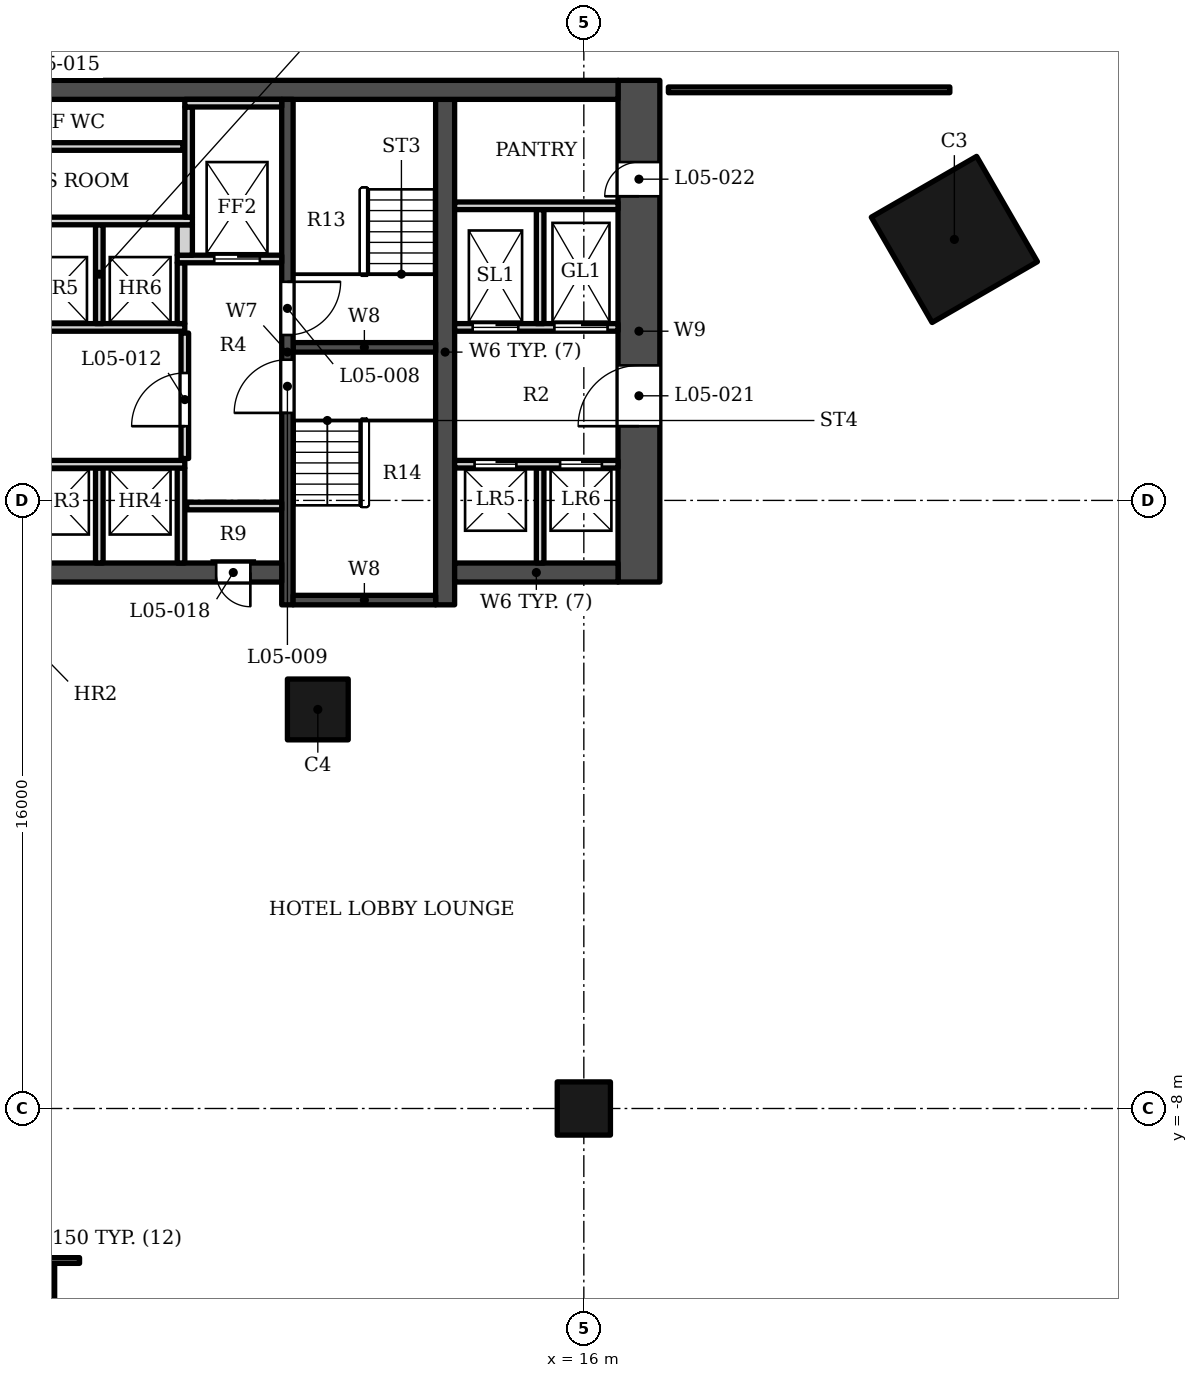
"""IFC4 building model, lengths in metres.
Left out: names, types, materials, properties, quantities, classifications, styles, units other than length and angle.
Written with IfcOpenShell. Run it as: python <this file> out.ifc"""

import sys

from ifc_helpers import new_model, si_unit, direction, frame, frame_2d, origin, origin_2d, place, context, subcontext, project, spatial, rectangle, extrude, element, fill, save


model = new_model("IFC4")
c1 = context("Model", 3, precision=1e-05, world=origin(), true_north=direction((0.0, 1.0)))
c2 = subcontext(c1, "Body", "Model", "MODEL_VIEW")
j1 = project(units=[si_unit("LENGTHUNIT", "METRE"), si_unit("PLANEANGLEUNIT", "RADIAN")], contexts=[c1])
p1 = place(None, origin())
s1 = spatial("IfcSite", under=j1, at=p1, CompositionType="ELEMENT")
p2 = place(p1, origin())
s2 = spatial("IfcBuilding", under=s1, at=p2, CompositionType="ELEMENT")
p3 = place(p2, frame((0.0, 0.0, 40.0)))
s3 = spatial("IfcBuildingStorey", under=s2, at=p3, CompositionType="ELEMENT", Elevation=40.0)
p4 = place(p3, frame((16.0, -8.0, 0.0), z_axis=(0.0, 0.0, 1.0), x_axis=(1.0, 0.0, 0.0)))
e1 = element("IfcColumn", 1, at=p4, inside=s3, PredefinedType="COLUMN", context=c2, shape_type="SweptSolid", body=[
    extrude(rectangle(XDim=1.4, YDim=1.4, at=origin_2d()), origin(), (0.0, 0.0, 1.0), 6.0),
])
p5 = place(p3, frame((25.75, 14.867, 0.0), z_axis=(0.0, 0.0, 1.0), x_axis=(-0.866025386331, -0.50000003023, 0.0)))
e2 = element("IfcColumn", 2, at=p5, inside=s3, PredefinedType="COLUMN", context=c2, shape_type="SweptSolid", body=[
    extrude(rectangle(XDim=3.2, YDim=3.2, at=origin_2d()), origin(), (0.0, 0.0, 1.0), 6.0),
])
p6 = place(p3, frame((9.0, 2.5, 0.0), z_axis=(0.0, 0.0, 1.0), x_axis=(1.0, 0.0, 0.0)))
e3 = element("IfcColumn", 3, at=p6, inside=s3, PredefinedType="COLUMN", context=c2, shape_type="SweptSolid", body=[
    extrude(rectangle(XDim=1.6, YDim=1.6, at=origin_2d()), origin(), (0.0, 0.0, 1.0), 6.0),
])
p7 = place(p3, frame((-16.9, 18.802, 0.0), z_axis=(0.0, 0.0, 1.0), x_axis=(1.0, 0.0, 0.0)))
e4 = element("IfcWall", 4, at=p7, inside=s3, PredefinedType="SHEAR", context=c2, shape_type="SweptSolid", body=[
    extrude(rectangle(XDim=33.8, YDim=0.5, at=frame_2d((16.9, 0.0))), origin(), (0.0, 0.0, 1.0), 6.0),
])
p8 = place(p3, frame((12.35, 5.253, 0.0), z_axis=(0.0, 0.0, 1.0), x_axis=(0.0, 1.0, 0.0)))
e5 = element("IfcWall", 5, at=p8, inside=s3, PredefinedType="SHEAR", context=c2, shape_type="SweptSolid", body=[
    extrude(rectangle(XDim=13.3, YDim=0.5, at=frame_2d((6.65, 0.0))), origin(), (0.0, 0.0, 1.0), 6.0),
])
p9 = place(p3, frame((8.2, 5.253, 0.0), z_axis=(0.0, 0.0, 1.0), x_axis=(0.0, 1.0, 0.0)))
e6 = element("IfcWall", 6, at=p9, inside=s3, PredefinedType="SHEAR", context=c2, shape_type="SweptSolid", body=[
    extrude(rectangle(XDim=13.3, YDim=0.3, at=frame_2d((6.65, 0.0))), origin(), (0.0, 0.0, 1.0), 6.0),
])
p10 = place(p9, frame((7.1, 0.0, 0.0)))
e7 = element("IfcOpeningElement", 7, at=p10, cuts=e6, PredefinedType="OPENING", context=c2, shape_type="SweptSolid", body=[
    extrude(rectangle(XDim=1.4, YDim=2.1, at=frame_2d((0.7, 1.05))), frame((0.0, 0.16, 0.0), z_axis=(0.0, -1.0, 0.0), x_axis=(1.0, 0.0, 0.0)), (0.0, 0.0, 1.0), 0.32),
])
p11 = place(p9, frame((5.05, 0.0, 0.0)))
e8 = element("IfcOpeningElement", 8, at=p11, cuts=e6, PredefinedType="OPENING", context=c2, shape_type="SweptSolid", body=[
    extrude(rectangle(XDim=1.4, YDim=2.1, at=frame_2d((0.7, 1.05))), frame((0.0, 0.16, 0.0), z_axis=(0.0, -1.0, 0.0), x_axis=(1.0, 0.0, 0.0)), (0.0, 0.0, 1.0), 0.32),
])
for number, where, z_axis, x_axis in (
    (9, (8.35, 12.028, 0.0), (0.0, 0.0, 1.0), (1.0, 0.0, 0.0)),
    (10, (8.35, 5.378, 0.0), (0.0, 0.0, 1.0), (1.0, 0.0, 0.0)),
):
    element("IfcWall", number, at=place(p3, frame(where, z_axis=z_axis, x_axis=x_axis)), inside=s3, PredefinedType="SHEAR", context=c2, shape_type="SweptSolid", body=[
        extrude(rectangle(XDim=3.75, YDim=0.25, at=frame_2d((1.875, 0.0))), origin(), (0.0, 0.0, 1.0), 6.0),
    ])
p12 = place(p3, frame((1.0, 6.103, 0.0), z_axis=(0.0, 0.0, 1.0), x_axis=(1.0, 0.0, 0.0)))
e11 = element("IfcWall", 11, at=p12, inside=s3, PredefinedType="SHEAR", context=c2, shape_type="SweptSolid", body=[
    extrude(rectangle(XDim=7.05, YDim=0.5, at=frame_2d((3.525, 0.0))), origin(), (0.0, 0.0, 1.0), 6.0),
])
p13 = place(p12, frame((5.325, 0.0, 0.0)))
e12 = element("IfcOpeningElement", 12, at=p13, cuts=e11, PredefinedType="OPENING", context=c2, shape_type="SweptSolid", body=[
    extrude(rectangle(XDim=0.9, YDim=2.1, at=frame_2d((0.45, 1.05))), frame((0.0, 0.26, 0.0), z_axis=(0.0, -1.0, 0.0), x_axis=(1.0, 0.0, 0.0)), (0.0, 0.0, 1.0), 0.52),
])
p14 = place(p3, frame((12.6, 6.103, 0.0), z_axis=(0.0, 0.0, 1.0), x_axis=(1.0, 0.0, 0.0)))
e13 = element("IfcWall", 13, at=p14, inside=s3, PredefinedType="SHEAR", context=c2, shape_type="SweptSolid", body=[
    extrude(rectangle(XDim=4.3, YDim=0.5, at=frame_2d((2.15, 0.0))), origin(), (0.0, 0.0, 1.0), 6.0),
])
p15 = place(p3, frame((17.45, 5.853, 0.0), z_axis=(0.0, 0.0, 1.0), x_axis=(0.0, 1.0, 0.0)))
e14 = element("IfcWall", 14, at=p15, inside=s3, PredefinedType="SHEAR", context=c2, shape_type="SweptSolid", body=[
    extrude(rectangle(XDim=13.2, YDim=1.1, at=frame_2d((6.6, 0.0))), origin(), (0.0, 0.0, 1.0), 6.0),
])
p16 = place(p15, frame((4.1, 0.0, 0.0)))
e15 = element("IfcOpeningElement", 15, at=p16, cuts=e14, PredefinedType="OPENING", context=c2, shape_type="SweptSolid", body=[
    extrude(rectangle(XDim=1.6, YDim=2.1, at=frame_2d((0.8, 1.05))), frame((0.0, 0.56, 0.0), z_axis=(0.0, -1.0, 0.0), x_axis=(1.0, 0.0, 0.0)), (0.0, 0.0, 1.0), 1.12),
])
p17 = place(p15, frame((10.15, 0.0, 0.0)))
e16 = element("IfcOpeningElement", 16, at=p17, cuts=e14, PredefinedType="OPENING", context=c2, shape_type="SweptSolid", body=[
    extrude(rectangle(XDim=0.9, YDim=2.1, at=frame_2d((0.45, 1.05))), frame((0.0, 0.56, 0.0), z_axis=(0.0, -1.0, 0.0), x_axis=(1.0, 0.0, 0.0)), (0.0, 0.0, 1.0), 1.12),
])
for number, where, z_axis, x_axis in (
    (17, (3.25, 6.353, 0.0), (0.0, 0.0, 1.0), (0.0, 1.0, 0.0)),
    (18, (5.4, 6.353, 0.0), (0.0, 0.0, 1.0), (0.0, 1.0, 0.0)),
    (19, (14.85, 6.353, 0.0), (0.0, 0.0, 1.0), (0.0, 1.0, 0.0)),
    (20, (5.55, 7.853, 0.0), (0.0, 0.0, 1.0), (1.0, 0.0, 0.0)),
):
    element("IfcWall", number, at=place(p3, frame(where, z_axis=z_axis, x_axis=x_axis)), inside=s3, PredefinedType="SOLIDWALL", context=c2, shape_type="SweptSolid", body=[
        extrude(rectangle(XDim=2.5, YDim=0.2, at=frame_2d((1.25, 0.0))), origin(), (0.0, 0.0, 1.0), 5.55),
    ])
p18 = place(p3, frame((1.0, 8.953, 0.0), z_axis=(0.0, 0.0, 1.0), x_axis=(1.0, 0.0, 0.0)))
e21 = element("IfcWall", 21, at=p18, inside=s3, PredefinedType="SOLIDWALL", context=c2, shape_type="SweptSolid", body=[
    extrude(rectangle(XDim=4.5, YDim=0.2, at=frame_2d((2.25, 0.0))), origin(), (0.0, 0.0, 1.0), 5.55),
])
p19 = place(p3, frame((12.6, 8.953, 0.0), z_axis=(0.0, 0.0, 1.0), x_axis=(1.0, 0.0, 0.0)))
e22 = element("IfcWall", 22, at=p19, inside=s3, PredefinedType="SOLIDWALL", context=c2, shape_type="SweptSolid", body=[
    extrude(rectangle(XDim=4.3, YDim=0.2, at=frame_2d((2.15, 0.0))), origin(), (0.0, 0.0, 1.0), 5.55),
])
p20 = place(p19, frame((0.525, 0.0, 0.0)))
e23 = element("IfcOpeningElement", 23, at=p20, cuts=e22, PredefinedType="OPENING", context=c2, shape_type="SweptSolid", body=[
    extrude(rectangle(XDim=1.1, YDim=2.1, at=frame_2d((0.55, 1.05))), frame((0.0, 0.11, 0.0), z_axis=(0.0, -1.0, 0.0), x_axis=(1.0, 0.0, 0.0)), (0.0, 0.0, 1.0), 0.22),
])
p21 = place(p19, frame((2.775, 0.0, 0.0)))
e24 = element("IfcOpeningElement", 24, at=p21, cuts=e22, PredefinedType="OPENING", context=c2, shape_type="SweptSolid", body=[
    extrude(rectangle(XDim=1.1, YDim=2.1, at=frame_2d((0.55, 1.05))), frame((0.0, 0.11, 0.0), z_axis=(0.0, -1.0, 0.0), x_axis=(1.0, 0.0, 0.0)), (0.0, 0.0, 1.0), 0.22),
])
p22 = place(p3, frame((5.5, 9.103, 0.0), z_axis=(0.0, 0.0, 1.0), x_axis=(0.0, 1.0, 0.0)))
e25 = element("IfcWall", 25, at=p22, inside=s3, PredefinedType="SOLIDWALL", context=c2, shape_type="SweptSolid", body=[
    extrude(rectangle(XDim=3.3, YDim=0.2, at=frame_2d((1.65, 0.0))), origin(), (0.0, 0.0, 1.0), 5.55),
])
p23 = place(p22, frame((0.85, 0.0, 0.0)))
e26 = element("IfcOpeningElement", 26, at=p23, cuts=e25, PredefinedType="OPENING", context=c2, shape_type="SweptSolid", body=[
    extrude(rectangle(XDim=1.4, YDim=2.1, at=frame_2d((0.7, 1.05))), frame((0.0, 0.11, 0.0), z_axis=(0.0, -1.0, 0.0), x_axis=(1.0, 0.0, 0.0)), (0.0, 0.0, 1.0), 0.22),
])
p24 = place(p3, frame((-1.5, 12.552, 0.0), z_axis=(0.0, 0.0, 1.0), x_axis=(1.0, 0.0, 0.0)))
e27 = element("IfcWall", 27, at=p24, inside=s3, PredefinedType="SOLIDWALL", context=c2, shape_type="SweptSolid", body=[
    extrude(rectangle(XDim=7.0, YDim=0.2, at=frame_2d((3.5, 0.0))), origin(), (0.0, 0.0, 1.0), 5.55),
])
p25 = place(p3, frame((12.6, 12.552, 0.0), z_axis=(0.0, 0.0, 1.0), x_axis=(1.0, 0.0, 0.0)))
e28 = element("IfcWall", 28, at=p25, inside=s3, PredefinedType="SOLIDWALL", context=c2, shape_type="SweptSolid", body=[
    extrude(rectangle(XDim=4.3, YDim=0.2, at=frame_2d((2.15, 0.0))), origin(), (0.0, 0.0, 1.0), 5.55),
])
p26 = place(p25, frame((0.475, 0.0, 0.0)))
e29 = element("IfcOpeningElement", 29, at=p26, cuts=e28, PredefinedType="OPENING", context=c2, shape_type="SweptSolid", body=[
    extrude(rectangle(XDim=1.2, YDim=2.1, at=frame_2d((0.6, 1.05))), frame((0.0, 0.11, 0.0), z_axis=(0.0, -1.0, 0.0), x_axis=(1.0, 0.0, 0.0)), (0.0, 0.0, 1.0), 0.22),
])
p27 = place(p25, frame((2.625, 0.0, 0.0)))
e30 = element("IfcOpeningElement", 30, at=p27, cuts=e28, PredefinedType="OPENING", context=c2, shape_type="SweptSolid", body=[
    extrude(rectangle(XDim=1.4, YDim=2.1, at=frame_2d((0.7, 1.05))), frame((0.0, 0.11, 0.0), z_axis=(0.0, -1.0, 0.0), x_axis=(1.0, 0.0, 0.0)), (0.0, 0.0, 1.0), 0.22),
])
p28 = place(p3, frame((3.25, 12.653, 0.0), z_axis=(0.0, 0.0, 1.0), x_axis=(0.0, 1.0, 0.0)))
e31 = element("IfcWall", 31, at=p28, inside=s3, PredefinedType="SOLIDWALL", context=c2, shape_type="SweptSolid", body=[
    extrude(rectangle(XDim=2.6, YDim=0.2, at=frame_2d((1.3, 0.0))), origin(), (0.0, 0.0, 1.0), 5.55),
])
p29 = place(p3, frame((5.4, 12.653, 0.0), z_axis=(0.0, 0.0, 1.0), x_axis=(0.0, 1.0, 0.0)))
e32 = element("IfcWall", 32, at=p29, inside=s3, PredefinedType="SOLIDWALL", context=c2, shape_type="SweptSolid", body=[
    extrude(rectangle(XDim=1.6, YDim=0.2, at=frame_2d((0.8, 0.0))), origin(), (0.0, 0.0, 1.0), 5.55),
])
p30 = place(p3, frame((14.85, 12.653, 0.0), z_axis=(0.0, 0.0, 1.0), x_axis=(0.0, 1.0, 0.0)))
e33 = element("IfcWall", 33, at=p30, inside=s3, PredefinedType="SOLIDWALL", context=c2, shape_type="SweptSolid", body=[
    extrude(rectangle(XDim=3.0, YDim=0.2, at=frame_2d((1.5, 0.0))), origin(), (0.0, 0.0, 1.0), 5.55),
])
p31 = place(p3, frame((5.3, 14.353, 0.0), z_axis=(0.0, 0.0, 1.0), x_axis=(1.0, 0.0, 0.0)))
e34 = element("IfcWall", 34, at=p31, inside=s3, PredefinedType="SOLIDWALL", context=c2, shape_type="SweptSolid", body=[
    extrude(rectangle(XDim=2.75, YDim=0.2, at=frame_2d((1.375, 0.0))), origin(), (0.0, 0.0, 1.0), 5.55),
])
p32 = place(p31, frame((0.975, 0.0, 0.0)))
e35 = element("IfcOpeningElement", 35, at=p32, cuts=e34, PredefinedType="OPENING", context=c2, shape_type="SweptSolid", body=[
    extrude(rectangle(XDim=1.2, YDim=2.1, at=frame_2d((0.6, 1.05))), frame((0.0, 0.11, 0.0), z_axis=(0.0, -1.0, 0.0), x_axis=(1.0, 0.0, 0.0)), (0.0, 0.0, 1.0), 0.22),
])
p33 = place(p3, frame((5.5, 14.453, 0.0), z_axis=(0.0, 0.0, 1.0), x_axis=(0.0, 1.0, 0.0)))
e36 = element("IfcWall", 36, at=p33, inside=s3, PredefinedType="SOLIDWALL", context=c2, shape_type="SweptSolid", body=[
    extrude(rectangle(XDim=0.8, YDim=0.4, at=frame_2d((0.4, 0.0))), origin(), (0.0, 0.0, 1.0), 5.55),
])
p34 = place(p3, frame((-1.5, 15.353, 0.0), z_axis=(0.0, 0.0, 1.0), x_axis=(1.0, 0.0, 0.0)))
e37 = element("IfcWall", 37, at=p34, inside=s3, PredefinedType="SOLIDWALL", context=c2, shape_type="SweptSolid", body=[
    extrude(rectangle(XDim=7.2, YDim=0.2, at=frame_2d((3.6, 0.0))), origin(), (0.0, 0.0, 1.0), 5.55),
])
p35 = place(p3, frame((5.6, 15.453, 0.0), z_axis=(0.0, 0.0, 1.0), x_axis=(0.0, 1.0, 0.0)))
e38 = element("IfcWall", 38, at=p35, inside=s3, PredefinedType="SOLIDWALL", context=c2, shape_type="SweptSolid", body=[
    extrude(rectangle(XDim=2.9, YDim=0.2, at=frame_2d((1.45, 0.0))), origin(), (0.0, 0.0, 1.0), 5.55),
])
p36 = place(p3, frame((12.6, 15.753, 0.0), z_axis=(0.0, 0.0, 1.0), x_axis=(1.0, 0.0, 0.0)))
e39 = element("IfcWall", 39, at=p36, inside=s3, PredefinedType="SOLIDWALL", context=c2, shape_type="SweptSolid", body=[
    extrude(rectangle(XDim=4.3, YDim=0.2, at=frame_2d((2.15, 0.0))), origin(), (0.0, 0.0, 1.0), 5.55),
])
p37 = place(p3, frame((-1.4, 17.312, 0.0), z_axis=(0.0, 0.0, 1.0), x_axis=(1.0, 0.0, 0.0)))
e40 = element("IfcWall", 40, at=p37, inside=s3, PredefinedType="SOLIDWALL", context=c2, shape_type="SweptSolid", body=[
    extrude(rectangle(XDim=6.85, YDim=0.2, at=frame_2d((3.425, 0.0))), origin(), (0.0, 0.0, 1.0), 5.55),
])
p38 = place(p3, frame((5.5, 18.453, 0.0), z_axis=(0.0, 0.0, 1.0), x_axis=(1.0, 0.0, 0.0)))
e41 = element("IfcWall", 41, at=p38, inside=s3, PredefinedType="SOLIDWALL", context=c2, shape_type="SweptSolid", body=[
    extrude(rectangle(XDim=2.55, YDim=0.2, at=frame_2d((1.275, 0.0))), origin(), (0.0, 0.0, 1.0), 5.55),
])
p39 = place(p3, frame((2.0, -31.458, 0.0), z_axis=(0.0, 0.0, 1.0), x_axis=(0.0, 1.0, 0.0)))
e42 = element("IfcWall", 42, at=p39, inside=s3, PredefinedType="PARTITIONING", context=c2, shape_type="SweptSolid", body=[
    extrude(rectangle(XDim=19.383, YDim=0.15, at=frame_2d((9.691, 0.0))), origin(), (0.0, 0.0, 1.0), 2.95),
])
p40 = place(p3, frame((0.8, -12.0, 0.0), z_axis=(0.0, 0.0, 1.0), x_axis=(1.0, 0.0, 0.0)))
e43 = element("IfcWall", 43, at=p40, inside=s3, PredefinedType="PARTITIONING", context=c2, shape_type="SweptSolid", body=[
    extrude(rectangle(XDim=1.93, YDim=0.15, at=frame_2d((0.965, 0.0))), origin(), (0.0, 0.0, 1.0), 2.95),
])
p41 = place(p3, frame((18.225, 18.803, 0.0), z_axis=(0.0, 0.0, 1.0), x_axis=(1.0, 0.0, 0.0)))
e44 = element("IfcWall", 44, at=p41, inside=s3, PredefinedType="PARTITIONING", context=c2, shape_type="SweptSolid", body=[
    extrude(rectangle(XDim=7.406, YDim=0.15, at=frame_2d((3.703, 0.0))), origin(), (0.0, 0.0, 1.0), 2.95),
])
p42 = place(p32, origin())
e45 = element("IfcDoor", 45, at=p42, inside=s3, OperationType="DOUBLE_DOOR_SLIDING", PredefinedType="DOOR", context=c2, shape_type="SweptSolid", body=[
    extrude(rectangle(XDim=1.2, YDim=2.1, at=frame_2d((0.6, 1.05))), frame((0.0, 0.025, 0.0), z_axis=(0.0, -1.0, 0.0), x_axis=(1.0, 0.0, 0.0)), (0.0, 0.0, 1.0), 0.05),
])
fill(e35, e45)
p43 = place(p20, origin())
e46 = element("IfcDoor", 46, at=p43, inside=s3, OperationType="DOUBLE_DOOR_SLIDING", PredefinedType="DOOR", context=c2, shape_type="SweptSolid", body=[
    extrude(rectangle(XDim=1.1, YDim=2.1, at=frame_2d((0.55, 1.05))), frame((0.0, 0.025, 0.0), z_axis=(0.0, -1.0, 0.0), x_axis=(1.0, 0.0, 0.0)), (0.0, 0.0, 1.0), 0.05),
])
fill(e23, e46)
p44 = place(p21, origin())
e47 = element("IfcDoor", 47, at=p44, inside=s3, OperationType="DOUBLE_DOOR_SLIDING", PredefinedType="DOOR", context=c2, shape_type="SweptSolid", body=[
    extrude(rectangle(XDim=1.1, YDim=2.1, at=frame_2d((0.55, 1.05))), frame((0.0, 0.025, 0.0), z_axis=(0.0, -1.0, 0.0), x_axis=(1.0, 0.0, 0.0)), (0.0, 0.0, 1.0), 0.05),
])
fill(e24, e47)
p45 = place(p26, origin())
e48 = element("IfcDoor", 48, at=p45, inside=s3, OperationType="DOUBLE_DOOR_SLIDING", PredefinedType="DOOR", context=c2, shape_type="SweptSolid", body=[
    extrude(rectangle(XDim=1.2, YDim=2.1, at=frame_2d((0.6, 1.05))), frame((0.0, 0.025, 0.0), z_axis=(0.0, -1.0, 0.0), x_axis=(1.0, 0.0, 0.0)), (0.0, 0.0, 1.0), 0.05),
])
fill(e29, e48)
p46 = place(p27, origin())
e49 = element("IfcDoor", 49, at=p46, inside=s3, OperationType="DOUBLE_DOOR_SLIDING", PredefinedType="DOOR", context=c2, shape_type="SweptSolid", body=[
    extrude(rectangle(XDim=1.4, YDim=2.1, at=frame_2d((0.7, 1.05))), frame((0.0, 0.025, 0.0), z_axis=(0.0, -1.0, 0.0), x_axis=(1.0, 0.0, 0.0)), (0.0, 0.0, 1.0), 0.05),
])
fill(e30, e49)
p47 = place(p10, origin())
e50 = element("IfcDoor", 50, at=p47, inside=s3, OperationType="SINGLE_SWING_RIGHT", PredefinedType="DOOR", context=c2, shape_type="SweptSolid", body=[
    extrude(rectangle(XDim=1.4, YDim=2.1, at=frame_2d((0.7, 1.05))), frame((0.0, 0.025, 0.0), z_axis=(0.0, -1.0, 0.0), x_axis=(1.0, 0.0, 0.0)), (0.0, 0.0, 1.0), 0.05),
])
fill(e7, e50)
p48 = place(p11, origin())
e51 = element("IfcDoor", 51, at=p48, inside=s3, OperationType="SINGLE_SWING_LEFT", PredefinedType="DOOR", context=c2, shape_type="SweptSolid", body=[
    extrude(rectangle(XDim=1.4, YDim=2.1, at=frame_2d((0.7, 1.05))), frame((0.0, 0.025, 0.0), z_axis=(0.0, -1.0, 0.0), x_axis=(1.0, 0.0, 0.0)), (0.0, 0.0, 1.0), 0.05),
])
fill(e8, e51)
p49 = place(p23, origin())
e52 = element("IfcDoor", 52, at=p49, inside=s3, OperationType="SINGLE_SWING_LEFT", PredefinedType="DOOR", context=c2, shape_type="SweptSolid", body=[
    extrude(rectangle(XDim=1.4, YDim=2.1, at=frame_2d((0.7, 1.05))), frame((0.0, 0.025, 0.0), z_axis=(0.0, -1.0, 0.0), x_axis=(1.0, 0.0, 0.0)), (0.0, 0.0, 1.0), 0.05),
])
fill(e26, e52)
p50 = place(p13, origin())
e53 = element("IfcDoor", 53, at=p50, inside=s3, OperationType="SINGLE_SWING_RIGHT", PredefinedType="DOOR", context=c2, shape_type="SweptSolid", body=[
    extrude(rectangle(XDim=0.9, YDim=2.1, at=frame_2d((0.45, 1.05))), frame((0.0, 0.025, 0.0), z_axis=(0.0, -1.0, 0.0), x_axis=(1.0, 0.0, 0.0)), (0.0, 0.0, 1.0), 0.05),
])
fill(e12, e53)
p51 = place(p16, origin())
e54 = element("IfcDoor", 54, at=p51, inside=s3, OperationType="DOUBLE_DOOR_SINGLE_SWING", PredefinedType="DOOR", context=c2, shape_type="SweptSolid", body=[
    extrude(rectangle(XDim=1.6, YDim=2.1, at=frame_2d((0.8, 1.05))), frame((0.0, 0.275, 0.0), z_axis=(0.0, -1.0, 0.0), x_axis=(1.0, 0.0, 0.0)), (0.0, 0.0, 1.0), 0.05),
])
fill(e15, e54)
p52 = place(p17, origin())
e55 = element("IfcDoor", 55, at=p52, inside=s3, OperationType="SINGLE_SWING_LEFT", PredefinedType="DOOR", context=c2, shape_type="SweptSolid", body=[
    extrude(rectangle(XDim=0.9, YDim=2.1, at=frame_2d((0.45, 1.05))), frame((0.0, 0.275, 0.0), z_axis=(0.0, -1.0, 0.0), x_axis=(1.0, 0.0, 0.0)), (0.0, 0.0, 1.0), 0.05),
])
fill(e16, e55)
save(model, sys.argv[1])
